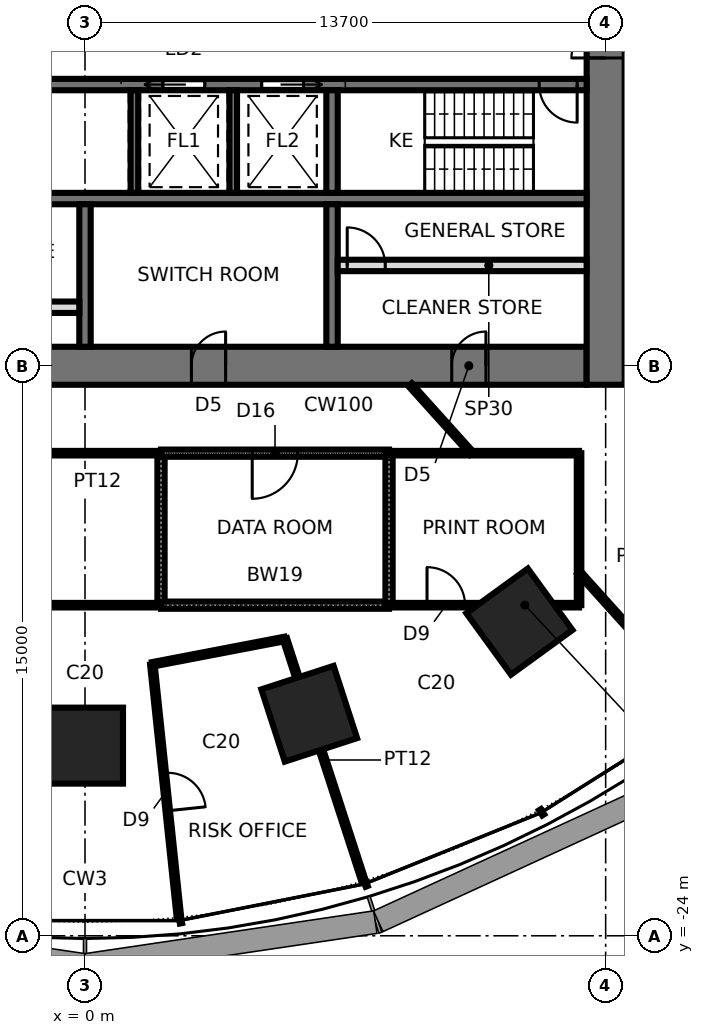
"""IFC4 building model, lengths in metres.
Left out: names, types, materials, properties, quantities, classifications, styles, units other than length and angle.
Written with IfcOpenShell. Run it as: python <this file> out.ifc"""

import sys

from ifc_helpers import new_model, si_unit, direction, frame, frame_2d, origin, origin_2d, place, context, subcontext, project, spatial, rectangle, extrude, element, fill, save


model = new_model("IFC4")
c1 = context("Model", 3, precision=1e-05, world=origin(), true_north=direction((0.0, 1.0)))
c2 = subcontext(c1, "Body", "Model", "MODEL_VIEW")
j1 = project(units=[si_unit("LENGTHUNIT", "METRE"), si_unit("PLANEANGLEUNIT", "RADIAN")], contexts=[c1])
p1 = place(None, origin())
s1 = spatial("IfcSite", under=j1, at=p1, CompositionType="ELEMENT")
p2 = place(p1, origin())
s2 = spatial("IfcBuilding", under=s1, at=p2, CompositionType="ELEMENT")
p3 = place(p2, frame((0.0, 0.0, 57.4)))
s3 = spatial("IfcBuildingStorey", under=s2, at=p3, CompositionType="ELEMENT", Elevation=57.4)
for number, where, z_axis, x_axis in (
    (1, (0.0, -18.996, 0.0), (0.0, 0.0, 1.0), (0.0, -1.0, 0.0)),
    (2, (5.9, -18.157, 0.0), (0.0, 0.0, 1.0), (0.309, -0.951, 0.0)),
    (3, (11.43, -15.733, 0.0), (0.0, 0.0, 1.0), (0.588, -0.809, 0.0)),
):
    element("IfcColumn", number, at=place(p3, frame(where, z_axis=z_axis, x_axis=x_axis)), inside=s3, PredefinedType="COLUMN", context=c2, shape_type="SweptSolid", body=[
        extrude(rectangle(XDim=2.0, YDim=2.0, at=origin_2d()), origin(), (0.0, 0.0, 1.0), 4.2),
    ])
p4 = place(p3, frame((-13.2, -9.0, 0.0), z_axis=(0.0, 0.0, 1.0), x_axis=(1.0, 0.0, 0.0)))
e4 = element("IfcWall", 4, at=p4, inside=s3, PredefinedType="SHEAR", context=c2, shape_type="SweptSolid", body=[
    extrude(rectangle(XDim=26.4, YDim=1.0, at=frame_2d((13.2, 0.0))), origin(), (0.0, 0.0, 1.0), 4.2),
])
p5 = place(p4, frame((2.65, 0.0, 0.0)))
e5 = element("IfcOpeningElement", 5, at=p5, cuts=e4, PredefinedType="OPENING", context=c2, shape_type="SweptSolid", body=[
    extrude(rectangle(XDim=0.9, YDim=2.1, at=frame_2d((0.45, 1.05))), frame((0.0, 0.51, 0.0), z_axis=(0.0, -1.0, 0.0), x_axis=(1.0, 0.0, 0.0)), (0.0, 0.0, 1.0), 1.02),
])
p6 = place(p4, frame((9.5, 0.0, 0.0)))
e6 = element("IfcOpeningElement", 6, at=p6, cuts=e4, PredefinedType="OPENING", context=c2, shape_type="SweptSolid", body=[
    extrude(rectangle(XDim=0.9, YDim=2.1, at=frame_2d((0.45, 1.05))), frame((0.0, 0.51, 0.0), z_axis=(0.0, -1.0, 0.0), x_axis=(1.0, 0.0, 0.0)), (0.0, 0.0, 1.0), 1.02),
])
p7 = place(p4, frame((16.0, 0.0, 0.0)))
e7 = element("IfcOpeningElement", 7, at=p7, cuts=e4, PredefinedType="OPENING", context=c2, shape_type="SweptSolid", body=[
    extrude(rectangle(XDim=0.9, YDim=2.1, at=frame_2d((0.45, 1.05))), frame((0.0, 0.51, 0.0), z_axis=(0.0, -1.0, 0.0), x_axis=(1.0, 0.0, 0.0)), (0.0, 0.0, 1.0), 1.02),
])
p8 = place(p4, frame((22.85, 0.0, 0.0)))
e8 = element("IfcOpeningElement", 8, at=p8, cuts=e4, PredefinedType="OPENING", context=c2, shape_type="SweptSolid", body=[
    extrude(rectangle(XDim=0.9, YDim=2.1, at=frame_2d((0.45, 1.05))), frame((0.0, 0.51, 0.0), z_axis=(0.0, -1.0, 0.0), x_axis=(1.0, 0.0, 0.0)), (0.0, 0.0, 1.0), 1.02),
])
p9 = place(p3, frame((13.7, -9.5, 0.0), z_axis=(0.0, 0.0, 1.0), x_axis=(0.0, 1.0, 0.0)))
e9 = element("IfcWall", 9, at=p9, inside=s3, PredefinedType="SHEAR", context=c2, shape_type="SweptSolid", body=[
    extrude(rectangle(XDim=19.0, YDim=1.0, at=frame_2d((9.5, 0.0))), origin(), (0.0, 0.0, 1.0), 4.2),
])
p10 = place(p9, frame((8.6, 0.0, 0.0)))
e10 = element("IfcOpeningElement", 10, at=p10, cuts=e9, PredefinedType="OPENING", context=c2, shape_type="SweptSolid", body=[
    extrude(rectangle(XDim=1.8, YDim=2.4, at=frame_2d((0.9, 1.2))), frame((0.0, 0.51, 0.0), z_axis=(0.0, -1.0, 0.0), x_axis=(1.0, 0.0, 0.0)), (0.0, 0.0, 1.0), 1.02),
])
p11 = place(p3, frame((-13.2, -1.6, 0.0), z_axis=(0.0, 0.0, 1.0), x_axis=(1.0, 0.0, 0.0)))
e11 = element("IfcWall", 11, at=p11, inside=s3, PredefinedType="SHEAR", context=c2, shape_type="SweptSolid", body=[
    extrude(rectangle(XDim=26.4, YDim=0.3, at=frame_2d((13.2, 0.0))), origin(), (0.0, 0.0, 1.0), 4.2),
])
p12 = place(p11, frame((25.15, 0.0, 0.0)))
e12 = element("IfcOpeningElement", 12, at=p12, cuts=e11, PredefinedType="OPENING", context=c2, shape_type="SweptSolid", body=[
    extrude(rectangle(XDim=1.0, YDim=2.1, at=frame_2d((0.5, 1.05))), frame((0.0, 0.16, 0.0), z_axis=(0.0, -1.0, 0.0), x_axis=(1.0, 0.0, 0.0)), (0.0, 0.0, 1.0), 0.32),
])
p13 = place(p11, frame((15.25, 0.0, 0.0)))
e13 = element("IfcOpeningElement", 13, at=p13, cuts=e11, PredefinedType="OPENING", context=c2, shape_type="SweptSolid", body=[
    extrude(rectangle(XDim=1.1, YDim=2.3, at=frame_2d((0.55, 1.15))), frame((0.0, 0.16, 0.0), z_axis=(0.0, -1.0, 0.0), x_axis=(1.0, 0.0, 0.0)), (0.0, 0.0, 1.0), 0.32),
])
p14 = place(p11, frame((17.85, 0.0, 0.0)))
e14 = element("IfcOpeningElement", 14, at=p14, cuts=e11, PredefinedType="OPENING", context=c2, shape_type="SweptSolid", body=[
    extrude(rectangle(XDim=1.1, YDim=2.3, at=frame_2d((0.55, 1.15))), frame((0.0, 0.16, 0.0), z_axis=(0.0, -1.0, 0.0), x_axis=(1.0, 0.0, 0.0)), (0.0, 0.0, 1.0), 0.32),
])
p15 = place(p11, frame((5.55, 0.0, 0.0)))
e15 = element("IfcOpeningElement", 15, at=p15, cuts=e11, PredefinedType="OPENING", context=c2, shape_type="SweptSolid", body=[
    extrude(rectangle(XDim=0.9, YDim=2.1, at=frame_2d((0.45, 1.05))), frame((0.0, 0.16, 0.0), z_axis=(0.0, -1.0, 0.0), x_axis=(1.0, 0.0, 0.0)), (0.0, 0.0, 1.0), 0.32),
])
p16 = place(p3, frame((-13.2, -4.6, 0.0), z_axis=(0.0, 0.0, 1.0), x_axis=(1.0, 0.0, 0.0)))
e16 = element("IfcWall", 16, at=p16, inside=s3, PredefinedType="SHEAR", context=c2, shape_type="SweptSolid", body=[
    extrude(rectangle(XDim=26.4, YDim=0.3, at=frame_2d((13.2, 0.0))), origin(), (0.0, 0.0, 1.0), 4.2),
])
p17 = place(p3, frame((6.5, -1.75, 0.0), z_axis=(0.0, 0.0, 1.0), x_axis=(0.0, -1.0, 0.0)))
e17 = element("IfcWall", 17, at=p17, inside=s3, PredefinedType="SHEAR", context=c2, shape_type="SweptSolid", body=[
    extrude(rectangle(XDim=2.7, YDim=0.3, at=frame_2d((1.35, 0.0))), origin(), (0.0, 0.0, 1.0), 4.2),
])
p18 = place(p3, frame((6.5, -4.75, 0.0), z_axis=(0.0, 0.0, 1.0), x_axis=(0.0, -1.0, 0.0)))
e18 = element("IfcWall", 18, at=p18, inside=s3, PredefinedType="SHEAR", context=c2, shape_type="SweptSolid", body=[
    extrude(rectangle(XDim=3.75, YDim=0.3, at=frame_2d((1.875, 0.0))), origin(), (0.0, 0.0, 1.0), 4.2),
])
for number, where, z_axis, x_axis in (
    (19, (1.3, -1.75, 0.0), (0.0, 0.0, 1.0), (0.0, -1.0, 0.0)),
    (20, (3.9, -1.75, 0.0), (0.0, 0.0, 1.0), (0.0, -1.0, 0.0)),
):
    element("IfcWall", number, at=place(p3, frame(where, z_axis=z_axis, x_axis=x_axis)), inside=s3, PredefinedType="SHEAR", context=c2, shape_type="SweptSolid", body=[
        extrude(rectangle(XDim=2.7, YDim=0.2, at=frame_2d((1.35, 0.0))), origin(), (0.0, 0.0, 1.0), 4.2),
    ])
p19 = place(p3, frame((0.0, -4.75, 0.0), z_axis=(0.0, 0.0, 1.0), x_axis=(0.0, -1.0, 0.0)))
e21 = element("IfcWall", 21, at=p19, inside=s3, PredefinedType="SHEAR", context=c2, shape_type="SweptSolid", body=[
    extrude(rectangle(XDim=3.75, YDim=0.3, at=frame_2d((1.875, 0.0))), origin(), (0.0, 0.0, 1.0), 4.2),
])
p20 = place(p3, frame((-6.35, -7.46, 0.0), z_axis=(0.0, 0.0, 1.0), x_axis=(1.0, 0.0, 0.0)))
e22 = element("IfcWall", 22, at=p20, inside=s3, PredefinedType="PARTITIONING", context=c2, shape_type="SweptSolid", body=[
    extrude(rectangle(XDim=6.2, YDim=0.3, at=frame_2d((3.1, 0.0))), origin(), (0.0, 0.0, 1.0), 4.04),
])
p21 = place(p20, frame((0.25, 0.0, 0.0)))
e23 = element("IfcOpeningElement", 23, at=p21, cuts=e22, PredefinedType="OPENING", context=c2, shape_type="SweptSolid", body=[
    extrude(rectangle(XDim=1.0, YDim=2.4, at=frame_2d((0.5, 1.2))), frame((0.0, 0.16, 0.0), z_axis=(0.0, -1.0, 0.0), x_axis=(1.0, 0.0, 0.0)), (0.0, 0.0, 1.0), 0.32),
])
p22 = place(p3, frame((6.65, -6.36, 0.0), z_axis=(0.0, 0.0, 1.0), x_axis=(1.0, 0.0, 0.0)))
e24 = element("IfcWall", 24, at=p22, inside=s3, PredefinedType="PARTITIONING", context=c2, shape_type="SweptSolid", body=[
    extrude(rectangle(XDim=6.55, YDim=0.3, at=frame_2d((3.275, 0.0))), origin(), (0.0, 0.0, 1.0), 4.04),
])
p23 = place(p22, frame((0.25, 0.0, 0.0)))
e25 = element("IfcOpeningElement", 25, at=p23, cuts=e24, PredefinedType="OPENING", context=c2, shape_type="SweptSolid", body=[
    extrude(rectangle(XDim=1.0, YDim=2.4, at=frame_2d((0.5, 1.2))), frame((0.0, 0.16, 0.0), z_axis=(0.0, -1.0, 0.0), x_axis=(1.0, 0.0, 0.0)), (0.0, 0.0, 1.0), 0.32),
])
p24 = place(p3, frame((2.0, -11.3, 0.0), z_axis=(0.0, 0.0, 1.0), x_axis=(-1.0, 0.0, 0.0)))
e26 = element("IfcWall", 26, at=p24, inside=s3, PredefinedType="PARTITIONING", context=c2, shape_type="SweptSolid", body=[
    extrude(rectangle(XDim=8.0, YDim=0.12, at=frame_2d((4.0, 0.0))), origin(), (0.0, 0.0, 1.0), 4.04),
])
p25 = place(p24, frame((3.5, 0.0, 0.0)))
e27 = element("IfcOpeningElement", 27, at=p25, cuts=e26, PredefinedType="OPENING", context=c2, shape_type="SweptSolid", body=[
    extrude(rectangle(XDim=1.0, YDim=2.4, at=frame_2d((0.5, 1.2))), frame((0.0, 0.07, 0.0), z_axis=(0.0, -1.0, 0.0), x_axis=(1.0, 0.0, 0.0)), (0.0, 0.0, 1.0), 0.14),
])
p26 = place(p3, frame((-6.0, -15.3, 0.0), z_axis=(0.0, 0.0, 1.0), x_axis=(1.0, 0.0, 0.0)))
e28 = element("IfcWall", 28, at=p26, inside=s3, PredefinedType="PARTITIONING", context=c2, shape_type="SweptSolid", body=[
    extrude(rectangle(XDim=8.0, YDim=0.12, at=frame_2d((4.0, 0.0))), origin(), (0.0, 0.0, 1.0), 3.586),
])
p27 = place(p3, frame((1.772, -16.857, 0.0), z_axis=(0.0, 0.0, 1.0), x_axis=(0.104542522915, -0.994520417539, 0.0)))
e29 = element("IfcWall", 29, at=p27, inside=s3, PredefinedType="PARTITIONING", context=c2, shape_type="SweptSolid", body=[
    extrude(rectangle(XDim=6.7, YDim=0.12, at=frame_2d((3.35, 0.0))), origin(), (0.0, 0.0, 1.0), 4.04),
])
p28 = place(p27, frame((2.875, 0.0, 0.0)))
e30 = element("IfcOpeningElement", 30, at=p28, cuts=e29, PredefinedType="OPENING", context=c2, shape_type="SweptSolid", body=[
    extrude(rectangle(XDim=1.0, YDim=2.4, at=frame_2d((0.5, 1.2))), frame((0.0, 0.07, 0.0), z_axis=(0.0, -1.0, 0.0), x_axis=(1.0, 0.0, 0.0)), (0.0, 0.0, 1.0), 0.14),
])
p29 = place(p3, frame((2.0, -11.3, 0.0), z_axis=(0.0, 0.0, 1.0), x_axis=(0.0, -1.0, 0.0)))
e31 = element("IfcWall", 31, at=p29, inside=s3, PredefinedType="SOLIDWALL", context=c2, shape_type="SweptSolid", body=[
    extrude(rectangle(XDim=4.0, YDim=0.19, at=frame_2d((2.0, 0.0))), origin(), (0.0, 0.0, 1.0), 4.04),
])
p30 = place(p3, frame((5.26, -16.188, 0.0), z_axis=(0.0, 0.0, 1.0), x_axis=(-0.982089213151, -0.188416499842, 0.0)))
e32 = element("IfcWall", 32, at=p30, inside=s3, PredefinedType="PARTITIONING", context=c2, shape_type="SweptSolid", body=[
    extrude(rectangle(XDim=3.552, YDim=0.12, at=frame_2d((1.776, 0.0))), origin(), (0.0, 0.0, 1.0), 4.04),
])
p31 = place(p3, frame((7.33, -22.56, 0.0), z_axis=(0.0, 0.0, 1.0), x_axis=(-0.309003676349, 0.951060843481, 0.0)))
e33 = element("IfcWall", 33, at=p31, inside=s3, PredefinedType="PARTITIONING", context=c2, shape_type="SweptSolid", body=[
    extrude(rectangle(XDim=6.7, YDim=0.12, at=frame_2d((3.35, 0.0))), origin(), (0.0, 0.0, 1.0), 2.84),
])
p32 = place(p3, frame((2.0, -15.3, 0.0), z_axis=(0.0, 0.0, 1.0), x_axis=(1.0, 0.0, 0.0)))
e34 = element("IfcWall", 34, at=p32, inside=s3, PredefinedType="SOLIDWALL", context=c2, shape_type="SweptSolid", body=[
    extrude(rectangle(XDim=6.0, YDim=0.19, at=frame_2d((3.0, 0.0))), origin(), (0.0, 0.0, 1.0), 3.586),
])
p33 = place(p3, frame((8.0, -11.3, 0.0), z_axis=(0.0, 0.0, 1.0), x_axis=(-1.0, 0.0, 0.0)))
e35 = element("IfcWall", 35, at=p33, inside=s3, PredefinedType="SOLIDWALL", context=c2, shape_type="SweptSolid", body=[
    extrude(rectangle(XDim=6.0, YDim=0.19, at=frame_2d((3.0, 0.0))), origin(), (0.0, 0.0, 1.0), 4.04),
])
p34 = place(p33, frame((2.4, 0.0, 0.0)))
e36 = element("IfcOpeningElement", 36, at=p34, cuts=e35, PredefinedType="OPENING", context=c2, shape_type="SweptSolid", body=[
    extrude(rectangle(XDim=1.2, YDim=2.1, at=frame_2d((0.6, 1.05))), frame((0.0, 0.105, 0.0), z_axis=(0.0, -1.0, 0.0), x_axis=(1.0, 0.0, 0.0)), (0.0, 0.0, 1.0), 0.21),
])
p35 = place(p3, frame((8.0, -11.3, 0.0), z_axis=(0.0, 0.0, 1.0), x_axis=(0.0, -1.0, 0.0)))
e37 = element("IfcWall", 37, at=p35, inside=s3, PredefinedType="SOLIDWALL", context=c2, shape_type="SweptSolid", body=[
    extrude(rectangle(XDim=4.0, YDim=0.19, at=frame_2d((2.0, 0.0))), origin(), (0.0, 0.0, 1.0), 4.04),
])
p36 = place(p3, frame((8.0, -15.3, 0.0), z_axis=(0.0, 0.0, 1.0), x_axis=(1.0, 0.0, 0.0)))
e38 = element("IfcWall", 38, at=p36, inside=s3, PredefinedType="PARTITIONING", context=c2, shape_type="SweptSolid", body=[
    extrude(rectangle(XDim=5.0, YDim=0.12, at=frame_2d((2.5, 0.0))), origin(), (0.0, 0.0, 1.0), 4.04),
])
p37 = place(p36, frame((1.0, 0.0, 0.0)))
e39 = element("IfcOpeningElement", 39, at=p37, cuts=e38, PredefinedType="OPENING", context=c2, shape_type="SweptSolid", body=[
    extrude(rectangle(XDim=1.0, YDim=2.4, at=frame_2d((0.5, 1.2))), frame((0.0, 0.07, 0.0), z_axis=(0.0, -1.0, 0.0), x_axis=(1.0, 0.0, 0.0)), (0.0, 0.0, 1.0), 0.14),
])
p38 = place(p3, frame((10.175, -11.3, 0.0), z_axis=(0.0, 0.0, 1.0), x_axis=(-0.669148472958, 0.74312873793, 0.0)))
e40 = element("IfcWall", 40, at=p38, inside=s3, PredefinedType="PARTITIONING", context=c2, shape_type="SweptSolid", body=[
    extrude(rectangle(XDim=2.422, YDim=0.12, at=frame_2d((1.211, 0.0))), origin(), (0.0, 0.0, 1.0), 4.04),
])
p39 = place(p3, frame((16.214, -18.008, 0.0), z_axis=(0.0, 0.0, 1.0), x_axis=(-0.669138803937, 0.743137444263, 0.0)))
e41 = element("IfcWall", 41, at=p39, inside=s3, PredefinedType="PARTITIONING", context=c2, shape_type="SweptSolid", body=[
    extrude(rectangle(XDim=4.804, YDim=0.12, at=frame_2d((2.402, 0.0))), origin(), (0.0, 0.0, 1.0), 4.04),
])
p40 = place(p3, frame((13.0, -11.3, 0.0), z_axis=(0.0, 0.0, 1.0), x_axis=(-1.0, 0.0, 0.0)))
e42 = element("IfcWall", 42, at=p40, inside=s3, PredefinedType="PARTITIONING", context=c2, shape_type="SweptSolid", body=[
    extrude(rectangle(XDim=5.0, YDim=0.12, at=frame_2d((2.5, 0.0))), origin(), (0.0, 0.0, 1.0), 4.04),
])
p41 = place(p3, frame((13.0, -15.3, 0.0), z_axis=(0.0, 0.0, 1.0), x_axis=(0.0, 1.0, 0.0)))
e43 = element("IfcWall", 43, at=p41, inside=s3, PredefinedType="PARTITIONING", context=c2, shape_type="SweptSolid", body=[
    extrude(rectangle(XDim=4.0, YDim=0.12, at=frame_2d((2.0, 0.0))), origin(), (0.0, 0.0, 1.0), 4.04),
])
p42 = place(p10, origin())
e44 = element("IfcDoor", 44, at=p42, inside=s3, OperationType="DOUBLE_DOOR_SINGLE_SWING", PredefinedType="DOOR", context=c2, shape_type="SweptSolid", body=[
    extrude(rectangle(XDim=1.72, YDim=2.36, at=frame_2d((0.9, 1.18))), frame((0.0, 0.025, 0.0), z_axis=(0.0, -1.0, 0.0), x_axis=(1.0, 0.0, 0.0)), (0.0, 0.0, 1.0), 0.05),
    extrude(rectangle(XDim=0.04, YDim=2.4, at=frame_2d((0.02, 1.2))), frame((0.0, 0.25, 0.0), z_axis=(0.0, -1.0, 0.0), x_axis=(1.0, 0.0, 0.0)), (0.0, 0.0, 1.0), 0.5),
    extrude(rectangle(XDim=0.04, YDim=2.4, at=frame_2d((1.78, 1.2))), frame((0.0, 0.25, 0.0), z_axis=(0.0, -1.0, 0.0), x_axis=(1.0, 0.0, 0.0)), (0.0, 0.0, 1.0), 0.5),
    extrude(rectangle(XDim=1.72, YDim=0.04, at=frame_2d((0.9, 2.38))), frame((0.0, 0.25, 0.0), z_axis=(0.0, -1.0, 0.0), x_axis=(1.0, 0.0, 0.0)), (0.0, 0.0, 1.0), 0.5),
])
fill(e10, e44)
p43 = place(p12, frame((1.0, 0.0, 0.0), z_axis=(0.0, 0.0, 1.0), x_axis=(-1.0, 0.0, 0.0)))
e45 = element("IfcDoor", 45, at=p43, inside=s3, OperationType="SINGLE_SWING_LEFT", PredefinedType="DOOR", context=c2, shape_type="SweptSolid", body=[
    extrude(rectangle(XDim=1.0, YDim=2.1, at=frame_2d((0.5, 1.05))), frame((0.0, 0.025, 0.0), z_axis=(0.0, -1.0, 0.0), x_axis=(1.0, 0.0, 0.0)), (0.0, 0.0, 1.0), 0.05),
])
fill(e12, e45)
p44 = place(p13, frame((1.1, 0.0, 0.0), z_axis=(0.0, 0.0, 1.0), x_axis=(-1.0, 0.0, 0.0)))
e46 = element("IfcDoor", 46, at=p44, inside=s3, OperationType="SLIDING_TO_RIGHT", PredefinedType="DOOR", context=c2, shape_type="SweptSolid", body=[
    extrude(rectangle(XDim=1.1, YDim=2.3, at=frame_2d((0.55, 1.15))), frame((0.0, 0.025, 0.0), z_axis=(0.0, -1.0, 0.0), x_axis=(1.0, 0.0, 0.0)), (0.0, 0.0, 1.0), 0.05),
])
fill(e13, e46)
p45 = place(p14, frame((1.1, 0.0, 0.0), z_axis=(0.0, 0.0, 1.0), x_axis=(-1.0, 0.0, 0.0)))
e47 = element("IfcDoor", 47, at=p45, inside=s3, OperationType="SLIDING_TO_LEFT", PredefinedType="DOOR", context=c2, shape_type="SweptSolid", body=[
    extrude(rectangle(XDim=1.1, YDim=2.3, at=frame_2d((0.55, 1.15))), frame((0.0, 0.025, 0.0), z_axis=(0.0, -1.0, 0.0), x_axis=(1.0, 0.0, 0.0)), (0.0, 0.0, 1.0), 0.05),
])
fill(e14, e47)
p46 = place(p7, origin())
e48 = element("IfcDoor", 48, at=p46, inside=s3, OperationType="SINGLE_SWING_RIGHT", PredefinedType="DOOR", context=c2, shape_type="SweptSolid", body=[
    extrude(rectangle(XDim=0.82, YDim=2.06, at=frame_2d((0.45, 1.03))), frame((0.0, 0.025, 0.0), z_axis=(0.0, -1.0, 0.0), x_axis=(1.0, 0.0, 0.0)), (0.0, 0.0, 1.0), 0.05),
    extrude(rectangle(XDim=0.04, YDim=2.1, at=frame_2d((0.02, 1.05))), frame((0.0, 0.25, 0.0), z_axis=(0.0, -1.0, 0.0), x_axis=(1.0, 0.0, 0.0)), (0.0, 0.0, 1.0), 0.5),
    extrude(rectangle(XDim=0.04, YDim=2.1, at=frame_2d((0.88, 1.05))), frame((0.0, 0.25, 0.0), z_axis=(0.0, -1.0, 0.0), x_axis=(1.0, 0.0, 0.0)), (0.0, 0.0, 1.0), 0.5),
    extrude(rectangle(XDim=0.82, YDim=0.04, at=frame_2d((0.45, 2.08))), frame((0.0, 0.25, 0.0), z_axis=(0.0, -1.0, 0.0), x_axis=(1.0, 0.0, 0.0)), (0.0, 0.0, 1.0), 0.5),
])
fill(e7, e48)
p47 = place(p8, origin())
e49 = element("IfcDoor", 49, at=p47, inside=s3, OperationType="SINGLE_SWING_RIGHT", PredefinedType="DOOR", context=c2, shape_type="SweptSolid", body=[
    extrude(rectangle(XDim=0.82, YDim=2.06, at=frame_2d((0.45, 1.03))), frame((0.0, 0.025, 0.0), z_axis=(0.0, -1.0, 0.0), x_axis=(1.0, 0.0, 0.0)), (0.0, 0.0, 1.0), 0.05),
    extrude(rectangle(XDim=0.04, YDim=2.1, at=frame_2d((0.02, 1.05))), frame((0.0, 0.25, 0.0), z_axis=(0.0, -1.0, 0.0), x_axis=(1.0, 0.0, 0.0)), (0.0, 0.0, 1.0), 0.5),
    extrude(rectangle(XDim=0.04, YDim=2.1, at=frame_2d((0.88, 1.05))), frame((0.0, 0.25, 0.0), z_axis=(0.0, -1.0, 0.0), x_axis=(1.0, 0.0, 0.0)), (0.0, 0.0, 1.0), 0.5),
    extrude(rectangle(XDim=0.82, YDim=0.04, at=frame_2d((0.45, 2.08))), frame((0.0, 0.25, 0.0), z_axis=(0.0, -1.0, 0.0), x_axis=(1.0, 0.0, 0.0)), (0.0, 0.0, 1.0), 0.5),
])
fill(e8, e49)
p48 = place(p23, origin())
e50 = element("IfcDoor", 50, at=p48, inside=s3, OperationType="SINGLE_SWING_LEFT", PredefinedType="DOOR", context=c2, shape_type="SweptSolid", body=[
    extrude(rectangle(XDim=1.0, YDim=2.4, at=frame_2d((0.5, 1.2))), frame((0.0, 0.025, 0.0), z_axis=(0.0, -1.0, 0.0), x_axis=(1.0, 0.0, 0.0)), (0.0, 0.0, 1.0), 0.05),
])
fill(e25, e50)
p49 = place(p28, origin())
e51 = element("IfcDoor", 51, at=p49, inside=s3, OperationType="SINGLE_SWING_RIGHT", PredefinedType="DOOR", context=c2, shape_type="SweptSolid", body=[
    extrude(rectangle(XDim=1.0, YDim=2.4, at=frame_2d((0.5, 1.2))), frame((0.0, 0.025, 0.0), z_axis=(0.0, -1.0, 0.0), x_axis=(1.0, 0.0, 0.0)), (0.0, 0.0, 1.0), 0.05),
])
fill(e30, e51)
p50 = place(p34, origin())
e52 = element("IfcDoor", 52, at=p50, inside=s3, OperationType="SINGLE_SWING_RIGHT", PredefinedType="DOOR", context=c2, shape_type="SweptSolid", body=[
    extrude(rectangle(XDim=1.2, YDim=2.1, at=frame_2d((0.6, 1.05))), frame((0.0, 0.025, 0.0), z_axis=(0.0, -1.0, 0.0), x_axis=(1.0, 0.0, 0.0)), (0.0, 0.0, 1.0), 0.05),
])
fill(e36, e52)
p51 = place(p37, origin())
e53 = element("IfcDoor", 53, at=p51, inside=s3, OperationType="SINGLE_SWING_LEFT", PredefinedType="DOOR", context=c2, shape_type="SweptSolid", body=[
    extrude(rectangle(XDim=1.0, YDim=2.4, at=frame_2d((0.5, 1.2))), frame((0.0, 0.025, 0.0), z_axis=(0.0, -1.0, 0.0), x_axis=(1.0, 0.0, 0.0)), (0.0, 0.0, 1.0), 0.05),
])
fill(e39, e53)
save(model, sys.argv[1])
